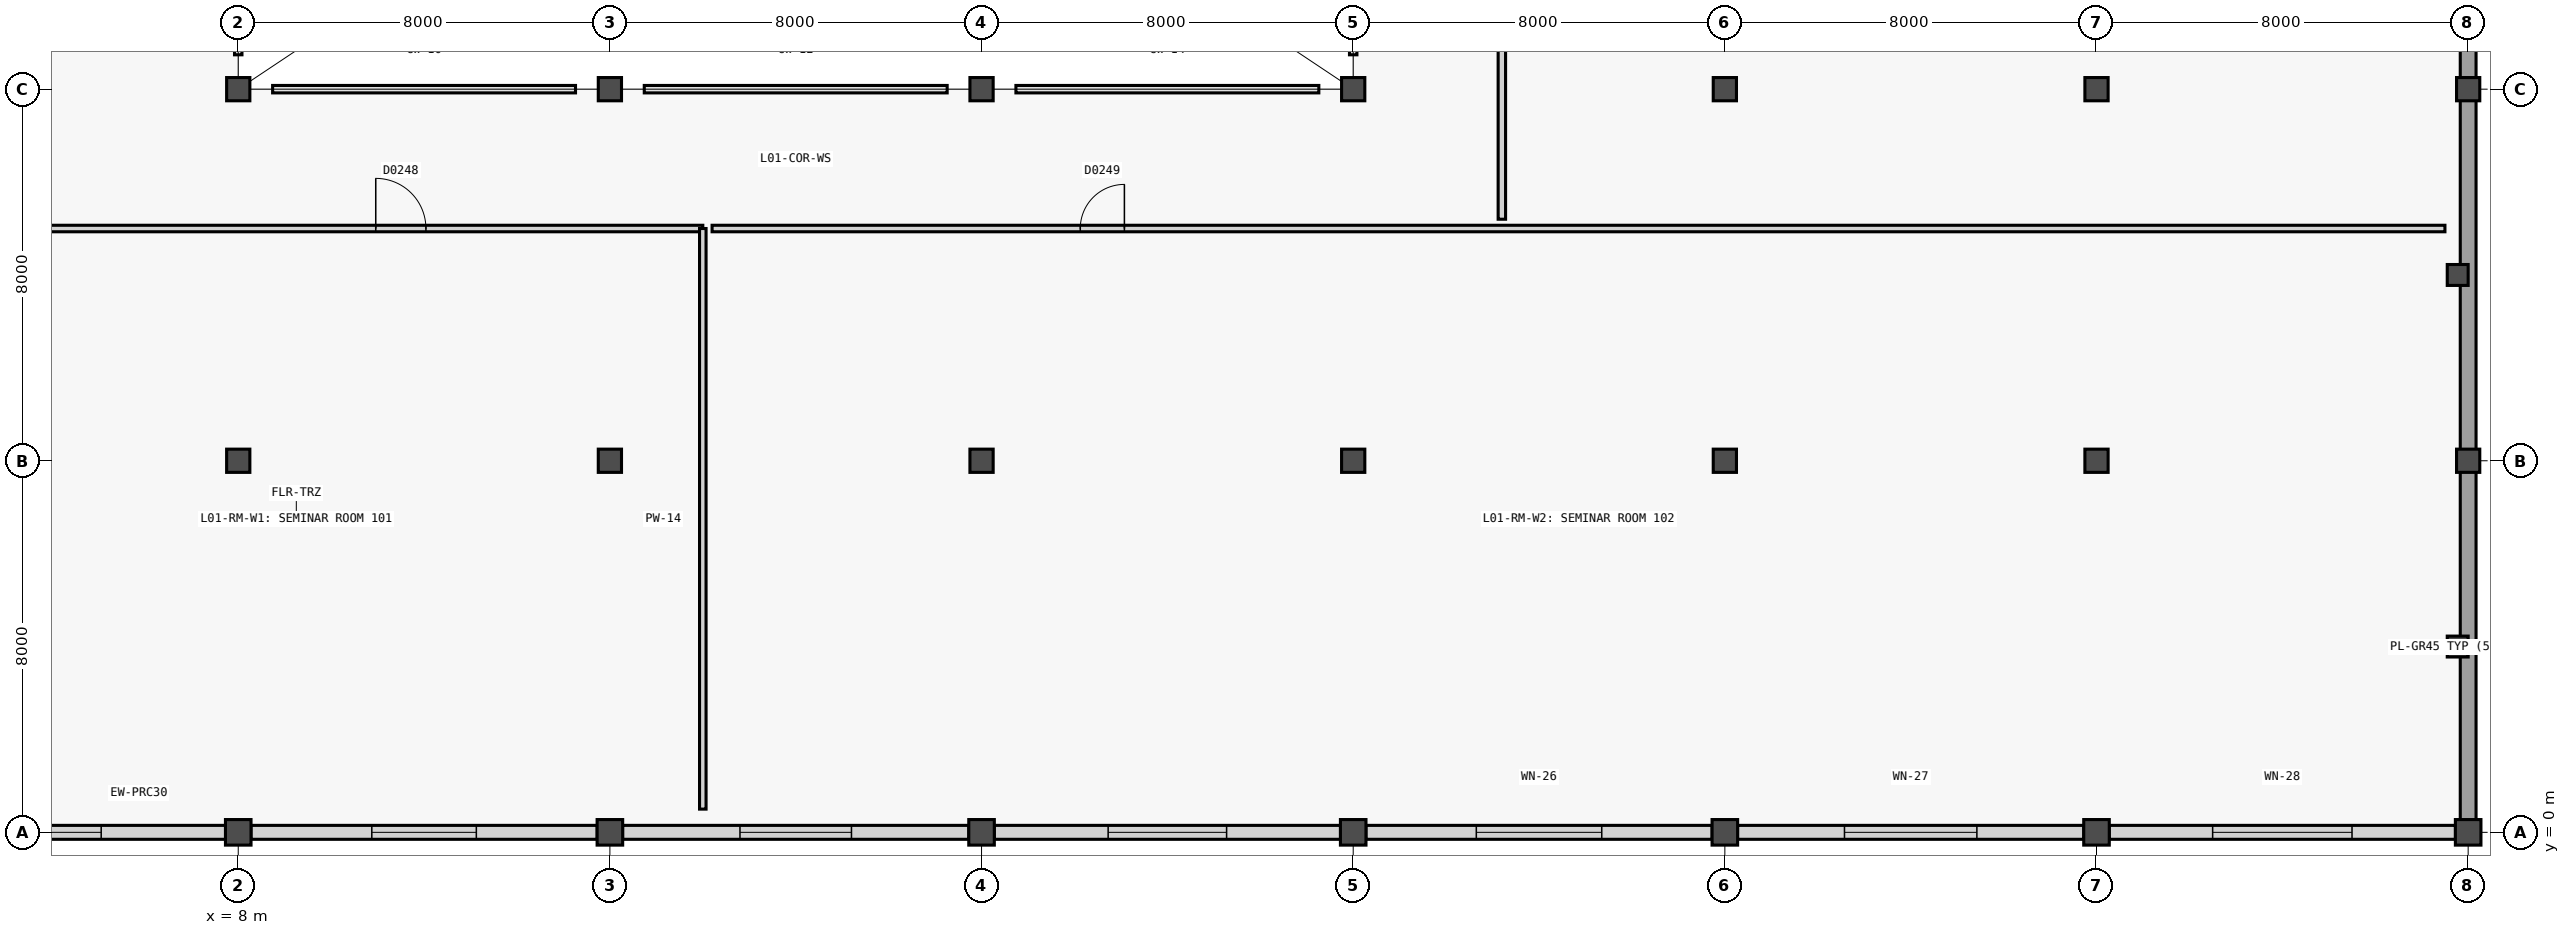
"""IFC4 building model, lengths in metres.
Left out: names, types, materials, properties, quantities, classifications, styles, units other than length and angle.
Written with IfcOpenShell. Run it as: python <this file> out.ifc"""

import sys

from ifc_helpers import new_model, si_unit, direction, frame, frame_2d, origin, origin_2d, place, context, subcontext, project, spatial, rectangle, extrude, element, fill, save


model = new_model("IFC4")
c1 = context("Model", 3, precision=1e-05, world=origin(), true_north=direction((0.0, 1.0)))
c2 = subcontext(c1, "Body", "Model", "MODEL_VIEW")
j1 = project(units=[si_unit("LENGTHUNIT", "METRE"), si_unit("PLANEANGLEUNIT", "RADIAN")], contexts=[c1])
p1 = place(None, origin())
s1 = spatial("IfcSite", under=j1, at=p1, CompositionType="ELEMENT")
p2 = place(p1, origin())
s2 = spatial("IfcBuilding", under=s1, at=p2, CompositionType="ELEMENT")
p3 = place(p2, frame((0.0, 0.0, 5.4)))
s3 = spatial("IfcBuildingStorey", under=s2, at=p3, CompositionType="ELEMENT", Elevation=5.4)
p4 = place(p3, frame((8.0, 0.0, 0.0), z_axis=(0.0, 0.0, 1.0), x_axis=(1.0, 0.0, 0.0)))
e1 = element("IfcColumn", 1, at=p4, inside=s3, PredefinedType="COLUMN", context=c2, shape_type="SweptSolid", body=[
    extrude(rectangle(XDim=0.55, YDim=0.55, at=origin_2d()), origin(), (0.0, 0.0, 1.0), 4.8),
])
for number, where, z_axis, x_axis in (
    (2, (8.0, 8.0, 0.0), (0.0, 0.0, 1.0), (1.0, 0.0, 0.0)),
    (3, (8.0, 16.0, 0.0), (0.0, 0.0, 1.0), (1.0, 0.0, 0.0)),
):
    element("IfcColumn", number, at=place(p3, frame(where, z_axis=z_axis, x_axis=x_axis)), inside=s3, PredefinedType="COLUMN", context=c2, shape_type="SweptSolid", body=[
        extrude(rectangle(XDim=0.5, YDim=0.5, at=origin_2d()), origin(), (0.0, 0.0, 1.0), 4.8),
    ])
p5 = place(p3, frame((16.0, 0.0, 0.0), z_axis=(0.0, 0.0, 1.0), x_axis=(1.0, 0.0, 0.0)))
e4 = element("IfcColumn", 4, at=p5, inside=s3, PredefinedType="COLUMN", context=c2, shape_type="SweptSolid", body=[
    extrude(rectangle(XDim=0.55, YDim=0.55, at=origin_2d()), origin(), (0.0, 0.0, 1.0), 4.8),
])
for number, where, z_axis, x_axis in (
    (5, (16.0, 8.0, 0.0), (0.0, 0.0, 1.0), (1.0, 0.0, 0.0)),
    (6, (16.0, 16.0, 0.0), (0.0, 0.0, 1.0), (1.0, 0.0, 0.0)),
):
    element("IfcColumn", number, at=place(p3, frame(where, z_axis=z_axis, x_axis=x_axis)), inside=s3, PredefinedType="COLUMN", context=c2, shape_type="SweptSolid", body=[
        extrude(rectangle(XDim=0.5, YDim=0.5, at=origin_2d()), origin(), (0.0, 0.0, 1.0), 4.8),
    ])
p6 = place(p3, frame((24.0, 0.0, 0.0), z_axis=(0.0, 0.0, 1.0), x_axis=(1.0, 0.0, 0.0)))
e7 = element("IfcColumn", 7, at=p6, inside=s3, PredefinedType="COLUMN", context=c2, shape_type="SweptSolid", body=[
    extrude(rectangle(XDim=0.55, YDim=0.55, at=origin_2d()), origin(), (0.0, 0.0, 1.0), 4.8),
])
for number, where, z_axis, x_axis in (
    (8, (24.0, 8.0, 0.0), (0.0, 0.0, 1.0), (1.0, 0.0, 0.0)),
    (9, (24.0, 16.0, 0.0), (0.0, 0.0, 1.0), (1.0, 0.0, 0.0)),
):
    element("IfcColumn", number, at=place(p3, frame(where, z_axis=z_axis, x_axis=x_axis)), inside=s3, PredefinedType="COLUMN", context=c2, shape_type="SweptSolid", body=[
        extrude(rectangle(XDim=0.5, YDim=0.5, at=origin_2d()), origin(), (0.0, 0.0, 1.0), 4.8),
    ])
p7 = place(p3, frame((32.0, 0.0, 0.0), z_axis=(0.0, 0.0, 1.0), x_axis=(1.0, 0.0, 0.0)))
e10 = element("IfcColumn", 10, at=p7, inside=s3, PredefinedType="COLUMN", context=c2, shape_type="SweptSolid", body=[
    extrude(rectangle(XDim=0.55, YDim=0.55, at=origin_2d()), origin(), (0.0, 0.0, 1.0), 4.8),
])
for number, where, z_axis, x_axis in (
    (11, (32.0, 8.0, 0.0), (0.0, 0.0, 1.0), (1.0, 0.0, 0.0)),
    (12, (32.0, 16.0, 0.0), (0.0, 0.0, 1.0), (1.0, 0.0, 0.0)),
):
    element("IfcColumn", number, at=place(p3, frame(where, z_axis=z_axis, x_axis=x_axis)), inside=s3, PredefinedType="COLUMN", context=c2, shape_type="SweptSolid", body=[
        extrude(rectangle(XDim=0.5, YDim=0.5, at=origin_2d()), origin(), (0.0, 0.0, 1.0), 4.8),
    ])
p8 = place(p3, frame((40.0, 0.0, 0.0), z_axis=(0.0, 0.0, 1.0), x_axis=(1.0, 0.0, 0.0)))
e13 = element("IfcColumn", 13, at=p8, inside=s3, PredefinedType="COLUMN", context=c2, shape_type="SweptSolid", body=[
    extrude(rectangle(XDim=0.55, YDim=0.55, at=origin_2d()), origin(), (0.0, 0.0, 1.0), 4.8),
])
for number, where, z_axis, x_axis in (
    (14, (40.0, 8.0, 0.0), (0.0, 0.0, 1.0), (1.0, 0.0, 0.0)),
    (15, (40.0, 16.0, 0.0), (0.0, 0.0, 1.0), (1.0, 0.0, 0.0)),
):
    element("IfcColumn", number, at=place(p3, frame(where, z_axis=z_axis, x_axis=x_axis)), inside=s3, PredefinedType="COLUMN", context=c2, shape_type="SweptSolid", body=[
        extrude(rectangle(XDim=0.5, YDim=0.5, at=origin_2d()), origin(), (0.0, 0.0, 1.0), 4.8),
    ])
p9 = place(p3, frame((48.0, 0.0, 0.0), z_axis=(0.0, 0.0, 1.0), x_axis=(1.0, 0.0, 0.0)))
e16 = element("IfcColumn", 16, at=p9, inside=s3, PredefinedType="COLUMN", context=c2, shape_type="SweptSolid", body=[
    extrude(rectangle(XDim=0.55, YDim=0.55, at=origin_2d()), origin(), (0.0, 0.0, 1.0), 4.8),
])
for number, where, z_axis, x_axis in (
    (17, (48.0, 8.0, 0.0), (0.0, 0.0, 1.0), (1.0, 0.0, 0.0)),
    (18, (48.0, 16.0, 0.0), (0.0, 0.0, 1.0), (1.0, 0.0, 0.0)),
):
    element("IfcColumn", number, at=place(p3, frame(where, z_axis=z_axis, x_axis=x_axis)), inside=s3, PredefinedType="COLUMN", context=c2, shape_type="SweptSolid", body=[
        extrude(rectangle(XDim=0.5, YDim=0.5, at=origin_2d()), origin(), (0.0, 0.0, 1.0), 4.8),
    ])
p10 = place(p3, frame((56.0, 0.0, 0.0), z_axis=(0.0, 0.0, 1.0), x_axis=(1.0, 0.0, 0.0)))
e19 = element("IfcColumn", 19, at=p10, inside=s3, PredefinedType="COLUMN", context=c2, shape_type="SweptSolid", body=[
    extrude(rectangle(XDim=0.55, YDim=0.55, at=origin_2d()), origin(), (0.0, 0.0, 1.0), 4.56),
])
for number, where, z_axis, x_axis in (
    (20, (56.0, 8.0, 0.0), (0.0, 0.0, 1.0), (1.0, 0.0, 0.0)),
    (21, (56.0, 16.0, 0.0), (0.0, 0.0, 1.0), (1.0, 0.0, 0.0)),
):
    element("IfcColumn", number, at=place(p3, frame(where, z_axis=z_axis, x_axis=x_axis)), inside=s3, PredefinedType="COLUMN", context=c2, shape_type="SweptSolid", body=[
        extrude(rectangle(XDim=0.5, YDim=0.5, at=origin_2d()), origin(), (0.0, 0.0, 1.0), 4.56),
    ])
for number, where, z_axis, x_axis in (
    (22, (55.775, 4.0, 0.0), (0.0, 0.0, 1.0), (1.0, 0.0, 0.0)),
    (23, (55.775, 12.0, 0.0), (0.0, 0.0, 1.0), (1.0, 0.0, 0.0)),
):
    element("IfcColumn", number, at=place(p3, frame(where, z_axis=z_axis, x_axis=x_axis)), inside=s3, PredefinedType="PILASTER", context=c2, shape_type="SweptSolid", body=[
        extrude(rectangle(XDim=0.45, YDim=0.45, at=origin_2d()), origin(), (0.0, 0.0, 1.0), 4.56),
    ])
p11 = place(p3, frame((56.0, 64.0, 0.0), z_axis=(0.0, 0.0, 1.0), x_axis=(0.0, -1.0, 0.0)))
e24 = element("IfcWall", 24, at=p11, inside=s3, PredefinedType="SOLIDWALL", context=c2, shape_type="SweptSolid", body=[
    extrude(rectangle(XDim=64.0, YDim=0.34, at=frame_2d((32.0, 0.0))), origin(), (0.0, 0.0, 1.0), 4.56),
])
p12 = place(p3, frame((7.727, 0.0, 0.0), z_axis=(0.0, 0.0, 1.0), x_axis=(-1.0, 0.0, 0.0)))
e25 = element("IfcWall", 25, at=p12, inside=s3, PredefinedType="SOLIDWALL", context=c2, shape_type="SweptSolid", body=[
    extrude(rectangle(XDim=7.454, YDim=0.3, at=frame_2d((3.727, 0.0))), origin(), (0.0, 0.0, 1.0), 4.02),
])
p13 = place(p12, frame((2.677, 0.0, 0.88)))
e26 = element("IfcOpeningElement", 26, at=p13, cuts=e25, PredefinedType="OPENING", context=c2, shape_type="SweptSolid", body=[
    extrude(rectangle(XDim=2.1, YDim=1.6, at=frame_2d((1.05, 0.8))), frame((0.0, 0.16, 0.0), z_axis=(0.0, -1.0, 0.0), x_axis=(1.0, 0.0, 0.0)), (0.0, 0.0, 1.0), 0.32),
])
p14 = place(p3, frame((15.727, 0.0, 0.0), z_axis=(0.0, 0.0, 1.0), x_axis=(-1.0, 0.0, 0.0)))
e27 = element("IfcWall", 27, at=p14, inside=s3, PredefinedType="SOLIDWALL", context=c2, shape_type="SweptSolid", body=[
    extrude(rectangle(XDim=7.454, YDim=0.3, at=frame_2d((3.727, 0.0))), origin(), (0.0, 0.0, 1.0), 4.02),
])
p15 = place(p14, frame((2.602, 0.0, 0.88)))
e28 = element("IfcOpeningElement", 28, at=p15, cuts=e27, PredefinedType="OPENING", context=c2, shape_type="SweptSolid", body=[
    extrude(rectangle(XDim=2.25, YDim=1.6, at=frame_2d((1.125, 0.8))), frame((0.0, 0.16, 0.0), z_axis=(0.0, -1.0, 0.0), x_axis=(1.0, 0.0, 0.0)), (0.0, 0.0, 1.0), 0.32),
])
p16 = place(p3, frame((23.727, 0.0, 0.0), z_axis=(0.0, 0.0, 1.0), x_axis=(-1.0, 0.0, 0.0)))
e29 = element("IfcWall", 29, at=p16, inside=s3, PredefinedType="SOLIDWALL", context=c2, shape_type="SweptSolid", body=[
    extrude(rectangle(XDim=7.454, YDim=0.3, at=frame_2d((3.727, 0.0))), origin(), (0.0, 0.0, 1.0), 4.02),
])
p17 = place(p16, frame((2.527, 0.0, 0.88)))
e30 = element("IfcOpeningElement", 30, at=p17, cuts=e29, PredefinedType="OPENING", context=c2, shape_type="SweptSolid", body=[
    extrude(rectangle(XDim=2.4, YDim=1.65, at=frame_2d((1.2, 0.825))), frame((0.0, 0.16, 0.0), z_axis=(0.0, -1.0, 0.0), x_axis=(1.0, 0.0, 0.0)), (0.0, 0.0, 1.0), 0.32),
])
p18 = place(p3, frame((31.727, 0.0, 0.0), z_axis=(0.0, 0.0, 1.0), x_axis=(-1.0, 0.0, 0.0)))
e31 = element("IfcWall", 31, at=p18, inside=s3, PredefinedType="SOLIDWALL", context=c2, shape_type="SweptSolid", body=[
    extrude(rectangle(XDim=7.454, YDim=0.3, at=frame_2d((3.727, 0.0))), origin(), (0.0, 0.0, 1.0), 4.02),
])
p19 = place(p18, frame((2.452, 0.0, 0.88)))
e32 = element("IfcOpeningElement", 32, at=p19, cuts=e31, PredefinedType="OPENING", context=c2, shape_type="SweptSolid", body=[
    extrude(rectangle(XDim=2.55, YDim=1.65, at=frame_2d((1.275, 0.825))), frame((0.0, 0.16, 0.0), z_axis=(0.0, -1.0, 0.0), x_axis=(1.0, 0.0, 0.0)), (0.0, 0.0, 1.0), 0.32),
])
p20 = place(p3, frame((39.727, 0.0, 0.0), z_axis=(0.0, 0.0, 1.0), x_axis=(-1.0, 0.0, 0.0)))
e33 = element("IfcWall", 33, at=p20, inside=s3, PredefinedType="SOLIDWALL", context=c2, shape_type="SweptSolid", body=[
    extrude(rectangle(XDim=7.454, YDim=0.3, at=frame_2d((3.727, 0.0))), origin(), (0.0, 0.0, 1.0), 4.02),
])
p21 = place(p20, frame((2.377, 0.0, 0.88)))
e34 = element("IfcOpeningElement", 34, at=p21, cuts=e33, PredefinedType="OPENING", context=c2, shape_type="SweptSolid", body=[
    extrude(rectangle(XDim=2.7, YDim=1.7, at=frame_2d((1.35, 0.85))), frame((0.0, 0.16, 0.0), z_axis=(0.0, -1.0, 0.0), x_axis=(1.0, 0.0, 0.0)), (0.0, 0.0, 1.0), 0.32),
])
p22 = place(p3, frame((47.727, 0.0, 0.0), z_axis=(0.0, 0.0, 1.0), x_axis=(-1.0, 0.0, 0.0)))
e35 = element("IfcWall", 35, at=p22, inside=s3, PredefinedType="SOLIDWALL", context=c2, shape_type="SweptSolid", body=[
    extrude(rectangle(XDim=7.454, YDim=0.3, at=frame_2d((3.727, 0.0))), origin(), (0.0, 0.0, 1.0), 4.02),
])
p23 = place(p22, frame((2.302, 0.0, 0.88)))
e36 = element("IfcOpeningElement", 36, at=p23, cuts=e35, PredefinedType="OPENING", context=c2, shape_type="SweptSolid", body=[
    extrude(rectangle(XDim=2.85, YDim=1.75, at=frame_2d((1.425, 0.875))), frame((0.0, 0.16, 0.0), z_axis=(0.0, -1.0, 0.0), x_axis=(1.0, 0.0, 0.0)), (0.0, 0.0, 1.0), 0.32),
])
p24 = place(p3, frame((55.727, 0.0, 0.0), z_axis=(0.0, 0.0, 1.0), x_axis=(-1.0, 0.0, 0.0)))
e37 = element("IfcWall", 37, at=p24, inside=s3, PredefinedType="SOLIDWALL", context=c2, shape_type="SweptSolid", body=[
    extrude(rectangle(XDim=7.454, YDim=0.3, at=frame_2d((3.727, 0.0))), origin(), (0.0, 0.0, 1.0), 4.06),
])
p25 = place(p24, frame((2.227, 0.0, 0.88)))
e38 = element("IfcOpeningElement", 38, at=p25, cuts=e37, PredefinedType="OPENING", context=c2, shape_type="SweptSolid", body=[
    extrude(rectangle(XDim=3.0, YDim=1.8, at=frame_2d((1.5, 0.9))), frame((0.0, 0.16, 0.0), z_axis=(0.0, -1.0, 0.0), x_axis=(1.0, 0.0, 0.0)), (0.0, 0.0, 1.0), 0.32),
])
p26 = place(p3, frame((0.5, 13.0, 0.0), z_axis=(0.0, 0.0, 1.0), x_axis=(1.0, 0.0, 0.0)))
e39 = element("IfcWall", 39, at=p26, inside=s3, PredefinedType="PARTITIONING", context=c2, shape_type="SweptSolid", body=[
    extrude(rectangle(XDim=17.5, YDim=0.14, at=frame_2d((8.75, 0.0))), origin(), (0.0, 0.0, 1.0), 4.54),
])
p27 = place(p26, frame((10.46, 0.0, 0.0)))
e40 = element("IfcOpeningElement", 40, at=p27, cuts=e39, PredefinedType="OPENING", context=c2, shape_type="SweptSolid", body=[
    extrude(rectangle(XDim=1.08, YDim=2.2, at=frame_2d((0.54, 1.1))), frame((0.0, 0.08, 0.0), z_axis=(0.0, -1.0, 0.0), x_axis=(1.0, 0.0, 0.0)), (0.0, 0.0, 1.0), 0.16),
])
p28 = place(p3, frame((18.0, 0.5, 0.0), z_axis=(0.0, 0.0, 1.0), x_axis=(0.0, 1.0, 0.0)))
e41 = element("IfcWall", 41, at=p28, inside=s3, PredefinedType="PARTITIONING", context=c2, shape_type="SweptSolid", body=[
    extrude(rectangle(XDim=12.5, YDim=0.14, at=frame_2d((6.25, 0.0))), origin(), (0.0, 0.0, 1.0), 4.54),
])
p29 = place(p3, frame((18.2, 13.0, 0.0), z_axis=(0.0, 0.0, 1.0), x_axis=(1.0, 0.0, 0.0)))
e42 = element("IfcWall", 42, at=p29, inside=s3, PredefinedType="PARTITIONING", context=c2, shape_type="SweptSolid", body=[
    extrude(rectangle(XDim=37.3, YDim=0.14, at=frame_2d((18.65, 0.0))), origin(), (0.0, 0.0, 1.0), 4.54),
])
p30 = place(p29, frame((7.925, 0.0, 0.0)))
e43 = element("IfcOpeningElement", 43, at=p30, cuts=e42, PredefinedType="OPENING", context=c2, shape_type="SweptSolid", body=[
    extrude(rectangle(XDim=0.95, YDim=2.1, at=frame_2d((0.475, 1.05))), frame((0.0, 0.08, 0.0), z_axis=(0.0, -1.0, 0.0), x_axis=(1.0, 0.0, 0.0)), (0.0, 0.0, 1.0), 0.16),
])
p31 = place(p3, frame((35.2, 13.2, 0.0), z_axis=(0.0, 0.0, 1.0), x_axis=(0.0, 1.0, 0.0)))
e44 = element("IfcWall", 44, at=p31, inside=s3, PredefinedType="PARTITIONING", context=c2, shape_type="SweptSolid", body=[
    extrude(rectangle(XDim=26.6, YDim=0.16, at=frame_2d((13.3, 0.0))), origin(), (0.0, 0.0, 1.0), 4.54),
])
p32 = place(p31, frame((13.825, 0.0, 0.0)))
e45 = element("IfcOpeningElement", 45, at=p32, cuts=e44, PredefinedType="OPENING", context=c2, shape_type="SweptSolid", body=[
    extrude(rectangle(XDim=1.75, YDim=2.2, at=frame_2d((0.875, 1.1))), frame((0.0, 0.09, 0.0), z_axis=(0.0, -1.0, 0.0), x_axis=(1.0, 0.0, 0.0)), (0.0, 0.0, 1.0), 0.18),
])
p33 = place(p13, origin())
e46 = element("IfcWindow", 46, at=p33, inside=s3, PartitioningType="SINGLE_PANEL", PredefinedType="WINDOW", context=c2, shape_type="SweptSolid", body=[
    extrude(rectangle(XDim=2.1, YDim=1.6, at=frame_2d((1.05, 0.8))), frame((0.0, 0.03, 0.0), z_axis=(0.0, -1.0, 0.0), x_axis=(1.0, 0.0, 0.0)), (0.0, 0.0, 1.0), 0.06),
])
fill(e26, e46)
p34 = place(p15, origin())
e47 = element("IfcWindow", 47, at=p34, inside=s3, PartitioningType="SINGLE_PANEL", PredefinedType="WINDOW", context=c2, shape_type="SweptSolid", body=[
    extrude(rectangle(XDim=2.25, YDim=1.6, at=frame_2d((1.125, 0.8))), frame((0.0, 0.03, 0.0), z_axis=(0.0, -1.0, 0.0), x_axis=(1.0, 0.0, 0.0)), (0.0, 0.0, 1.0), 0.06),
])
fill(e28, e47)
p35 = place(p17, origin())
e48 = element("IfcWindow", 48, at=p35, inside=s3, PartitioningType="SINGLE_PANEL", PredefinedType="WINDOW", context=c2, shape_type="SweptSolid", body=[
    extrude(rectangle(XDim=2.4, YDim=1.65, at=frame_2d((1.2, 0.825))), frame((0.0, 0.03, 0.0), z_axis=(0.0, -1.0, 0.0), x_axis=(1.0, 0.0, 0.0)), (0.0, 0.0, 1.0), 0.06),
])
fill(e30, e48)
p36 = place(p19, origin())
e49 = element("IfcWindow", 49, at=p36, inside=s3, PartitioningType="SINGLE_PANEL", PredefinedType="WINDOW", context=c2, shape_type="SweptSolid", body=[
    extrude(rectangle(XDim=2.55, YDim=1.65, at=frame_2d((1.275, 0.825))), frame((0.0, 0.03, 0.0), z_axis=(0.0, -1.0, 0.0), x_axis=(1.0, 0.0, 0.0)), (0.0, 0.0, 1.0), 0.06),
])
fill(e32, e49)
p37 = place(p21, origin())
e50 = element("IfcWindow", 50, at=p37, inside=s3, PartitioningType="SINGLE_PANEL", PredefinedType="WINDOW", context=c2, shape_type="SweptSolid", body=[
    extrude(rectangle(XDim=2.7, YDim=1.7, at=frame_2d((1.35, 0.85))), frame((0.0, 0.03, 0.0), z_axis=(0.0, -1.0, 0.0), x_axis=(1.0, 0.0, 0.0)), (0.0, 0.0, 1.0), 0.06),
])
fill(e34, e50)
p38 = place(p23, origin())
e51 = element("IfcWindow", 51, at=p38, inside=s3, PartitioningType="SINGLE_PANEL", PredefinedType="WINDOW", context=c2, shape_type="SweptSolid", body=[
    extrude(rectangle(XDim=2.85, YDim=1.75, at=frame_2d((1.425, 0.875))), frame((0.0, 0.03, 0.0), z_axis=(0.0, -1.0, 0.0), x_axis=(1.0, 0.0, 0.0)), (0.0, 0.0, 1.0), 0.06),
])
fill(e36, e51)
p39 = place(p25, origin())
e52 = element("IfcWindow", 52, at=p39, inside=s3, PartitioningType="SINGLE_PANEL", PredefinedType="WINDOW", context=c2, shape_type="SweptSolid", body=[
    extrude(rectangle(XDim=3.0, YDim=1.8, at=frame_2d((1.5, 0.9))), frame((0.0, 0.03, 0.0), z_axis=(0.0, -1.0, 0.0), x_axis=(1.0, 0.0, 0.0)), (0.0, 0.0, 1.0), 0.06),
])
fill(e38, e52)
p40 = place(p27, origin())
e53 = element("IfcDoor", 53, at=p40, inside=s3, OperationType="SINGLE_SWING_LEFT", PredefinedType="DOOR", context=c2, shape_type="SweptSolid", body=[
    extrude(rectangle(XDim=1.08, YDim=2.2, at=frame_2d((0.54, 1.1))), frame((0.0, 0.025, 0.0), z_axis=(0.0, -1.0, 0.0), x_axis=(1.0, 0.0, 0.0)), (0.0, 0.0, 1.0), 0.05),
])
fill(e40, e53)
p41 = place(p30, origin())
e54 = element("IfcDoor", 54, at=p41, inside=s3, OperationType="SINGLE_SWING_RIGHT", PredefinedType="DOOR", context=c2, shape_type="SweptSolid", body=[
    extrude(rectangle(XDim=0.95, YDim=2.1, at=frame_2d((0.475, 1.05))), frame((0.0, 0.025, 0.0), z_axis=(0.0, -1.0, 0.0), x_axis=(1.0, 0.0, 0.0)), (0.0, 0.0, 1.0), 0.05),
])
fill(e43, e54)
save(model, sys.argv[1])
